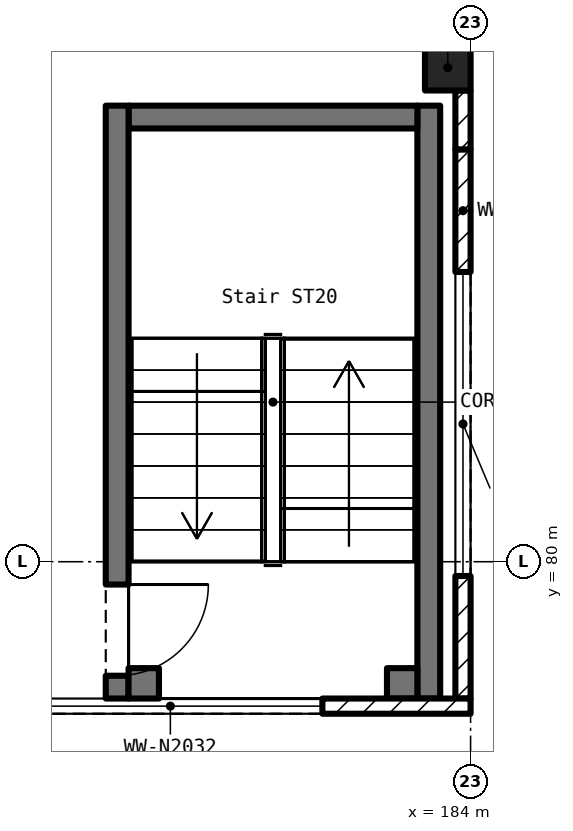
"""IFC4 building model, lengths in metres.
Left out: names, types, materials, properties, quantities, classifications, styles, units other than length and angle.
Written with IfcOpenShell. Run it as: python <this file> out.ifc"""

import sys

from ifc_helpers import new_model, si_unit, direction, frame, frame_2d, origin, origin_2d, place, context, subcontext, project, spatial, rectangle, extrude, element, fill, save


model = new_model("IFC4")
c1 = context("Model", 3, precision=1e-05, world=origin(), true_north=direction((0.0, 1.0)))
c2 = subcontext(c1, "Body", "Model", "MODEL_VIEW")
j1 = project(units=[si_unit("LENGTHUNIT", "METRE"), si_unit("PLANEANGLEUNIT", "RADIAN")], contexts=[c1])
p1 = place(None, origin())
s1 = spatial("IfcSite", under=j1, at=p1, CompositionType="ELEMENT")
p2 = place(p1, origin())
s2 = spatial("IfcBuilding", under=s1, at=p2, CompositionType="ELEMENT")
p3 = place(p2, frame((0.0, 0.0, 11.5)))
s3 = spatial("IfcBuildingStorey", under=s2, at=p3, CompositionType="ELEMENT", Elevation=11.5)
p4 = place(p3, frame((183.7, 86.5, 0.0), z_axis=(0.0, 0.0, 1.0), x_axis=(1.0, 0.0, 0.0)))
e1 = element("IfcColumn", 1, at=p4, inside=s3, PredefinedType="COLUMN", context=c2, shape_type="SweptSolid", body=[
    extrude(rectangle(XDim=0.6, YDim=0.6, at=origin_2d()), origin(), (0.0, 0.0, 1.0), 5.5),
])
p5 = place(p3, frame((183.9, 78.2, 0.0), z_axis=(0.0, 0.0, 1.0), x_axis=(0.0, 1.0, 0.0)))
e2 = element("IfcWall", 2, at=p5, inside=s3, PredefinedType="SOLIDWALL", context=c2, shape_type="SweptSolid", body=[
    extrude(rectangle(XDim=7.225, YDim=0.2, at=frame_2d((3.613, 0.0))), origin(), (0.0, 0.0, 1.0), 4.55),
])
p6 = place(p5, frame((1.612, 0.0, 1.0)))
e3 = element("IfcOpeningElement", 3, at=p6, cuts=e2, PredefinedType="OPENING", context=c2, shape_type="SweptSolid", body=[
    extrude(rectangle(XDim=4.0, YDim=1.8, at=frame_2d((2.0, 0.9))), frame((0.0, 0.112, 0.0), z_axis=(0.0, -1.0, 0.0), x_axis=(1.0, 0.0, 0.0)), (0.0, 0.0, 1.0), 0.224),
])
p7 = place(p3, frame((183.9, 85.425, 0.0), z_axis=(0.0, 0.0, 1.0), x_axis=(0.0, 1.0, 0.0)))
e4 = element("IfcWall", 4, at=p7, inside=s3, PredefinedType="SOLIDWALL", context=c2, shape_type="SweptSolid", body=[
    extrude(rectangle(XDim=0.775, YDim=0.2, at=frame_2d((0.387, 0.0))), origin(), (0.0, 0.0, 1.0), 4.55),
])
p8 = place(p3, frame((176.1, 78.1, 0.0), z_axis=(0.0, 0.0, 1.0), x_axis=(1.0, 0.0, 0.0)))
e5 = element("IfcWall", 5, at=p8, inside=s3, PredefinedType="SOLIDWALL", context=c2, shape_type="SweptSolid", body=[
    extrude(rectangle(XDim=7.9, YDim=0.2, at=frame_2d((3.95, 0.0))), origin(), (0.0, 0.0, 1.0), 4.55),
])
p9 = place(p8, frame((1.95, 0.0, 1.0)))
e6 = element("IfcOpeningElement", 6, at=p9, cuts=e5, PredefinedType="OPENING", context=c2, shape_type="SweptSolid", body=[
    extrude(rectangle(XDim=4.0, YDim=1.8, at=frame_2d((2.0, 0.9))), frame((0.0, 0.112, 0.0), z_axis=(0.0, -1.0, 0.0), x_axis=(1.0, 0.0, 0.0)), (0.0, 0.0, 1.0), 0.224),
])
p10 = place(p3, frame((183.45, 78.2, 0.0), z_axis=(0.0, 0.0, 1.0), x_axis=(0.0, 1.0, 0.0)))
e7 = element("IfcWall", 7, at=p10, inside=s3, PredefinedType="SOLIDWALL", context=c2, shape_type="SweptSolid", body=[
    extrude(rectangle(XDim=7.8, YDim=0.3, at=frame_2d((3.9, 0.0))), origin(), (0.0, 0.0, 1.0), 5.5),
])
p11 = place(p3, frame((183.3, 85.85, 0.0), z_axis=(0.0, 0.0, 1.0), x_axis=(-1.0, 0.0, 0.0)))
e8 = element("IfcWall", 8, at=p11, inside=s3, PredefinedType="SOLIDWALL", context=c2, shape_type="SweptSolid", body=[
    extrude(rectangle(XDim=3.8, YDim=0.3, at=frame_2d((1.9, 0.0))), origin(), (0.0, 0.0, 1.0), 5.5),
])
p12 = place(p3, frame((179.35, 86.0, 0.0), z_axis=(0.0, 0.0, 1.0), x_axis=(0.0, -1.0, 0.0)))
e9 = element("IfcWall", 9, at=p12, inside=s3, PredefinedType="SOLIDWALL", context=c2, shape_type="SweptSolid", body=[
    extrude(rectangle(XDim=7.8, YDim=0.3, at=frame_2d((3.9, 0.0))), origin(), (0.0, 0.0, 1.0), 5.5),
])
p13 = place(p12, frame((6.3, 0.0, 0.0)))
e10 = element("IfcOpeningElement", 10, at=p13, cuts=e9, PredefinedType="OPENING", context=c2, shape_type="SweptSolid", body=[
    extrude(rectangle(XDim=1.2, YDim=2.1, at=frame_2d((0.6, 1.05))), frame((0.0, 0.162, 0.0), z_axis=(0.0, -1.0, 0.0), x_axis=(1.0, 0.0, 0.0)), (0.0, 0.0, 1.0), 0.324),
])
p14 = place(p3, frame((179.5, 78.4, 0.0), z_axis=(0.0, 0.0, 1.0), x_axis=(1.0, 0.0, 0.0)))
e11 = element("IfcWall", 11, at=p14, inside=s3, PredefinedType="SOLIDWALL", context=c2, shape_type="SweptSolid", body=[
    extrude(rectangle(XDim=0.4, YDim=0.4, at=frame_2d((0.2, 0.0))), origin(), (0.0, 0.0, 1.0), 5.5),
])
p15 = place(p3, frame((182.9, 78.4, 0.0), z_axis=(0.0, 0.0, 1.0), x_axis=(1.0, 0.0, 0.0)))
e12 = element("IfcWall", 12, at=p15, inside=s3, PredefinedType="SOLIDWALL", context=c2, shape_type="SweptSolid", body=[
    extrude(rectangle(XDim=0.4, YDim=0.4, at=frame_2d((0.2, 0.0))), origin(), (0.0, 0.0, 1.0), 5.5),
])
p16 = place(p6, origin())
e13 = element("IfcWindow", 13, at=p16, inside=s3, PartitioningType="DOUBLE_PANEL_VERTICAL", PredefinedType="WINDOW", context=c2, shape_type="SweptSolid", body=[
    extrude(rectangle(XDim=4.0, YDim=1.8, at=frame_2d((2.0, 0.9))), frame((0.0, 0.03, 0.0), z_axis=(0.0, -1.0, 0.0), x_axis=(1.0, 0.0, 0.0)), (0.0, 0.0, 1.0), 0.06),
])
fill(e3, e13)
p17 = place(p9, origin())
e14 = element("IfcWindow", 14, at=p17, inside=s3, PartitioningType="DOUBLE_PANEL_VERTICAL", PredefinedType="WINDOW", context=c2, shape_type="SweptSolid", body=[
    extrude(rectangle(XDim=4.0, YDim=1.8, at=frame_2d((2.0, 0.9))), frame((0.0, 0.03, 0.0), z_axis=(0.0, -1.0, 0.0), x_axis=(1.0, 0.0, 0.0)), (0.0, 0.0, 1.0), 0.06),
])
fill(e6, e14)
p18 = place(p13, origin())
e15 = element("IfcDoor", 15, at=p18, inside=s3, OperationType="SINGLE_SWING_LEFT", PredefinedType="DOOR", context=c2, shape_type="SweptSolid", body=[
    extrude(rectangle(XDim=1.2, YDim=2.1, at=frame_2d((0.6, 1.05))), frame((0.0, 0.025, 0.0), z_axis=(0.0, -1.0, 0.0), x_axis=(1.0, 0.0, 0.0)), (0.0, 0.0, 1.0), 0.05),
])
fill(e10, e15)
save(model, sys.argv[1])
